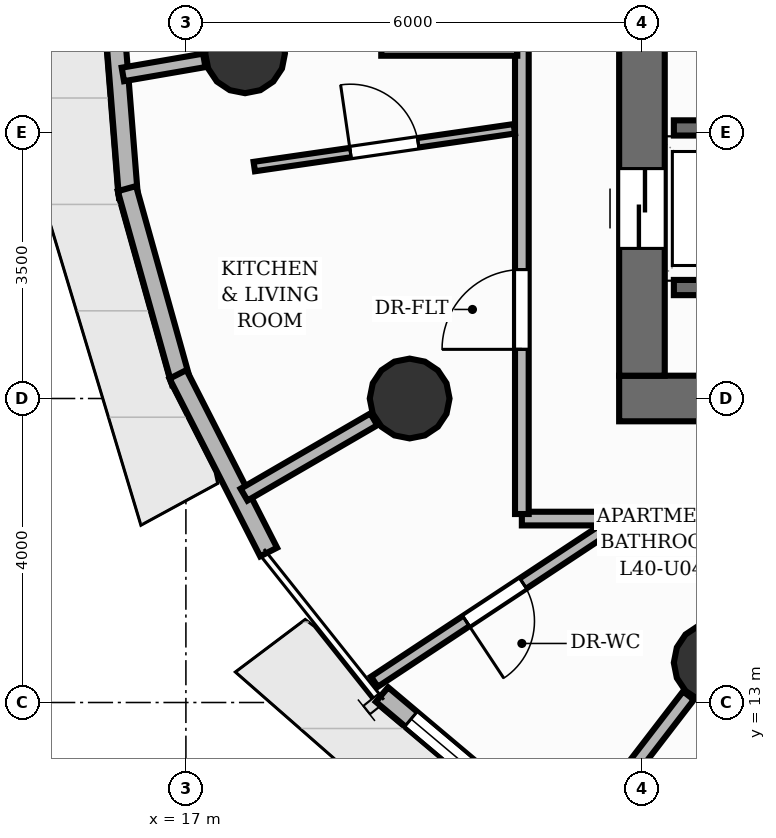
"""IFC4 building model, lengths in metres.
Left out: names, types, materials, properties, quantities, classifications, styles, units other than length and angle.
Written with IfcOpenShell. Run it as: python <this file> out.ifc"""

import sys

from ifc_helpers import new_model, si_unit, direction, frame, frame_2d, origin, origin_2d, place, context, subcontext, project, spatial, rectangle, circle, extrude, element, fill, save


model = new_model("IFC4")
c1 = context("Model", 3, precision=1e-05, world=origin(), true_north=direction((0.0, 1.0)))
c2 = subcontext(c1, "Body", "Model", "MODEL_VIEW")
j1 = project(units=[si_unit("LENGTHUNIT", "METRE"), si_unit("PLANEANGLEUNIT", "RADIAN")], contexts=[c1])
p1 = place(None, origin())
s1 = spatial("IfcSite", under=j1, at=p1, CompositionType="ELEMENT")
p2 = place(p1, origin())
s2 = spatial("IfcBuilding", under=s1, at=p2, CompositionType="ELEMENT")
p3 = place(p2, frame((0.0, 0.0, 136.16)))
s3 = spatial("IfcBuildingStorey", under=s2, at=p3, CompositionType="ELEMENT", Elevation=136.16)
p4 = place(p3, frame((22.7, 17.0, 0.0), z_axis=(0.0, 0.0, 1.0), x_axis=(1.0, 0.0, 0.0)))
e1 = element("IfcWall", 1, at=p4, inside=s3, PredefinedType="SHEAR", context=c2, shape_type="SweptSolid", body=[
    extrude(rectangle(XDim=15.1, YDim=0.6, at=frame_2d((7.55, 0.0))), origin(), (0.0, 0.0, 1.0), 3.2),
])
p5 = place(p4, frame((5.8, 0.0, 0.0)))
e2 = element("IfcOpeningElement", 2, at=p5, cuts=e1, PredefinedType="OPENING", context=c2, shape_type="SweptSolid", body=[
    extrude(rectangle(XDim=1.1, YDim=2.15, at=frame_2d((0.55, 1.075))), frame((0.0, 0.31, 0.0), z_axis=(0.0, -1.0, 0.0), x_axis=(1.0, 0.0, 0.0)), (0.0, 0.0, 1.0), 0.62),
])
p6 = place(p4, frame((9.35, 0.0, 0.0)))
e3 = element("IfcOpeningElement", 3, at=p6, cuts=e1, PredefinedType="OPENING", context=c2, shape_type="SweptSolid", body=[
    extrude(rectangle(XDim=0.9, YDim=2.1, at=frame_2d((0.45, 1.05))), frame((0.0, 0.31, 0.0), z_axis=(0.0, -1.0, 0.0), x_axis=(1.0, 0.0, 0.0)), (0.0, 0.0, 1.0), 0.62),
])
p7 = place(p3, frame((23.0, 17.3, 0.0), z_axis=(0.0, 0.0, 1.0), x_axis=(0.0, 1.0, 0.0)))
e4 = element("IfcWall", 4, at=p7, inside=s3, PredefinedType="SHEAR", context=c2, shape_type="SweptSolid", body=[
    extrude(rectangle(XDim=13.4, YDim=0.6, at=frame_2d((6.7, 0.0))), origin(), (0.0, 0.0, 1.0), 3.2),
])
p8 = place(p7, frame((1.675, 0.0, 0.0)))
e5 = element("IfcOpeningElement", 5, at=p8, cuts=e4, PredefinedType="OPENING", context=c2, shape_type="SweptSolid", body=[
    extrude(rectangle(XDim=1.05, YDim=2.15, at=frame_2d((0.525, 1.075))), frame((0.0, 0.31, 0.0), z_axis=(0.0, -1.0, 0.0), x_axis=(1.0, 0.0, 0.0)), (0.0, 0.0, 1.0), 0.62),
])
p9 = place(p7, frame((6.175, 0.0, 0.0)))
e6 = element("IfcOpeningElement", 6, at=p9, cuts=e4, PredefinedType="OPENING", context=c2, shape_type="SweptSolid", body=[
    extrude(rectangle(XDim=1.05, YDim=2.15, at=frame_2d((0.525, 1.075))), frame((0.0, 0.31, 0.0), z_axis=(0.0, -1.0, 0.0), x_axis=(1.0, 0.0, 0.0)), (0.0, 0.0, 1.0), 0.62),
])
p10 = place(p7, frame((10.675, 0.0, 0.0)))
e7 = element("IfcOpeningElement", 7, at=p10, cuts=e4, PredefinedType="OPENING", context=c2, shape_type="SweptSolid", body=[
    extrude(rectangle(XDim=1.05, YDim=2.15, at=frame_2d((0.525, 1.075))), frame((0.0, 0.31, 0.0), z_axis=(0.0, -1.0, 0.0), x_axis=(1.0, 0.0, 0.0)), (0.0, 0.0, 1.0), 0.62),
])
for number, where, z_axis, x_axis in (
    (8, (17.779, 21.542, 0.0), (0.0, 0.0, 1.0), (1.0, 0.0, 0.0)),
    (9, (19.944, 17.0, 0.0), (0.0, 0.0, 1.0), (1.0, 0.0, 0.0)),
    (10, (23.944, 13.523, 0.0), (0.0, 0.0, 1.0), (1.0, 0.0, 0.0)),
):
    element("IfcColumn", number, at=place(p3, frame(where, z_axis=z_axis, x_axis=x_axis)), inside=s3, PredefinedType="COLUMN", context=c2, shape_type="SweptSolid", body=[
        extrude(circle(Radius=0.525, at=origin_2d()), origin(), (0.0, 0.0, 1.0), 3.2),
    ])
p11 = place(p3, frame((16.244, 19.65, 0.0), z_axis=(0.0, 0.0, 1.0), x_axis=(-0.079420906371, 0.996841170714, 0.0)))
e11 = element("IfcWall", 11, at=p11, inside=s3, PredefinedType="SOLIDWALL", context=c2, shape_type="SweptSolid", body=[
    extrude(rectangle(XDim=2.693, YDim=0.25, at=frame_2d((1.346, 0.0))), origin(), (0.0, 0.0, 1.0), 2.96),
])
p12 = place(p3, frame((16.938, 17.211, 0.0), z_axis=(0.0, 0.0, 1.0), x_axis=(-0.269469206067, 0.963009006698, 0.0)))
e12 = element("IfcWall", 12, at=p12, inside=s3, PredefinedType="SOLIDWALL", context=c2, shape_type="SweptSolid", body=[
    extrude(rectangle(XDim=2.648, YDim=0.25, at=frame_2d((1.324, 0.0))), origin(), (0.0, 0.0, 1.0), 2.96),
])
p13 = place(p3, frame((18.088, 14.98, 0.0), z_axis=(0.0, 0.0, 1.0), x_axis=(-0.454196134835, 0.890901717981, 0.0)))
e13 = element("IfcWall", 13, at=p13, inside=s3, PredefinedType="SOLIDWALL", context=c2, shape_type="SweptSolid", body=[
    extrude(rectangle(XDim=2.624, YDim=0.25, at=frame_2d((1.312, 0.0))), origin(), (0.0, 0.0, 1.0), 2.96),
])
p14 = place(p3, frame((21.605, 11.399, 0.0), z_axis=(0.0, 0.0, 1.0), x_axis=(-0.764825125467, 0.644237943197, 0.0)))
e14 = element("IfcWall", 14, at=p14, inside=s3, PredefinedType="SOLIDWALL", context=c2, shape_type="SweptSolid", body=[
    extrude(rectangle(XDim=2.648, YDim=0.25, at=frame_2d((1.324, 0.0))), origin(), (0.0, 0.0, 1.0), 2.96),
])
p15 = place(p14, frame((0.499, 0.0, 0.85)))
e15 = element("IfcOpeningElement", 15, at=p15, cuts=e14, PredefinedType="OPENING", context=c2, shape_type="SweptSolid", body=[
    extrude(rectangle(XDim=1.65, YDim=1.55, at=frame_2d((0.825, 0.775))), frame((0.0, 0.135, 0.0), z_axis=(0.0, -1.0, 0.0), x_axis=(1.0, 0.0, 0.0)), (0.0, 0.0, 1.0), 0.27),
])
for number, where, z_axis, x_axis in (
    (16, (23.42, 18.46, 0.0), (0.0, 0.0, 1.0), (1.0, 0.0, 0.0)),
    (17, (23.42, 20.56, 0.0), (0.0, 0.0, 1.0), (1.0, 0.0, 0.0)),
):
    element("IfcWall", number, at=place(p3, frame(where, z_axis=z_axis, x_axis=x_axis)), inside=s3, PredefinedType="SHEAR", context=c2, shape_type="SweptSolid", body=[
        extrude(rectangle(XDim=1.71, YDim=0.2, at=frame_2d((0.855, 0.0))), origin(), (0.0, 0.0, 1.0), 3.2),
    ])
p16 = place(p3, frame((17.242, 21.449, 0.0), z_axis=(0.0, 0.0, 1.0), x_axis=(-0.985361391556, -0.170478526599, 0.0)))
e18 = element("IfcWall", 18, at=p16, inside=s3, PredefinedType="PARTITIONING", context=c2, shape_type="SweptSolid", body=[
    extrude(rectangle(XDim=1.087, YDim=0.18, at=frame_2d((0.543, 0.0))), origin(), (0.0, 0.0, 1.0), 2.336),
])
p17 = place(p3, frame((19.472, 16.726, 0.0), z_axis=(0.0, 0.0, 1.0), x_axis=(-0.864844369658, -0.502040054448, 0.0)))
e19 = element("IfcWall", 19, at=p17, inside=s3, PredefinedType="PARTITIONING", context=c2, shape_type="SweptSolid", body=[
    extrude(rectangle(XDim=1.974, YDim=0.18, at=frame_2d((0.987, 0.0))), origin(), (0.0, 0.0, 1.0), 2.336),
])
p18 = place(p3, frame((23.612, 13.092, 0.0), z_axis=(0.0, 0.0, 1.0), x_axis=(-0.609549509747, -0.79274800231, 0.0)))
e20 = element("IfcWall", 20, at=p18, inside=s3, PredefinedType="PARTITIONING", context=c2, shape_type="SweptSolid", body=[
    extrude(rectangle(XDim=2.415, YDim=0.18, at=frame_2d((1.208, 0.0))), origin(), (0.0, 0.0, 1.0), 2.336),
])
p19 = place(p3, frame((39.08, 15.42, 0.0), z_axis=(0.0, 0.0, 1.0), x_axis=(-1.0, 0.0, 0.0)))
e21 = element("IfcWall", 21, at=p19, inside=s3, PredefinedType="PARTITIONING", context=c2, shape_type="SweptSolid", body=[
    extrude(rectangle(XDim=16.39, YDim=0.18, at=frame_2d((8.195, 0.0))), origin(), (0.0, 0.0, 1.0), 2.955),
])
p20 = place(p19, frame((4.593, 0.0, 0.0)))
e22 = element("IfcOpeningElement", 22, at=p20, cuts=e21, PredefinedType="OPENING", context=c2, shape_type="SweptSolid", body=[
    extrude(rectangle(XDim=1.05, YDim=2.15, at=frame_2d((0.525, 1.075))), frame((0.0, 0.1, 0.0), z_axis=(0.0, -1.0, 0.0), x_axis=(1.0, 0.0, 0.0)), (0.0, 0.0, 1.0), 0.2),
])
p21 = place(p3, frame((22.746, 15.42, 0.0), z_axis=(0.0, 0.0, 1.0), x_axis=(-1.0, 0.0, 0.0)))
e23 = element("IfcWall", 23, at=p21, inside=s3, PredefinedType="PARTITIONING", context=c2, shape_type="SweptSolid", body=[
    extrude(rectangle(XDim=1.326, YDim=0.18, at=frame_2d((0.663, 0.0))), origin(), (0.0, 0.0, 1.0), 2.955),
])
p22 = place(p3, frame((21.42, 15.48, 0.0), z_axis=(0.0, 0.0, 1.0), x_axis=(0.0, 1.0, 0.0)))
e24 = element("IfcWall", 24, at=p22, inside=s3, PredefinedType="PARTITIONING", context=c2, shape_type="SweptSolid", body=[
    extrude(rectangle(XDim=6.12, YDim=0.18, at=frame_2d((3.06, 0.0))), origin(), (0.0, 0.0, 1.0), 2.955),
])
p23 = place(p22, frame((2.167, 0.0, 0.0)))
e25 = element("IfcOpeningElement", 25, at=p23, cuts=e24, PredefinedType="OPENING", context=c2, shape_type="SweptSolid", body=[
    extrude(rectangle(XDim=1.05, YDim=2.15, at=frame_2d((0.525, 1.075))), frame((0.0, 0.1, 0.0), z_axis=(0.0, -1.0, 0.0), x_axis=(1.0, 0.0, 0.0)), (0.0, 0.0, 1.0), 0.2),
])
p24 = place(p3, frame((21.36, 21.6, 0.0), z_axis=(0.0, 0.0, 1.0), x_axis=(-1.0, 0.0, 0.0)))
e26 = element("IfcWall", 26, at=p24, inside=s3, PredefinedType="PARTITIONING", context=c2, shape_type="SweptSolid", body=[
    extrude(rectangle(XDim=1.79, YDim=0.18, at=frame_2d((0.895, 0.0))), origin(), (0.0, 0.0, 1.0), 2.336),
])
p25 = place(p3, frame((22.643, 15.365, 0.0), z_axis=(0.0, 0.0, 1.0), x_axis=(-0.83413433024, -0.551561346647, 0.0)))
e27 = element("IfcWall", 27, at=p25, inside=s3, PredefinedType="PLUMBINGWALL", context=c2, shape_type="SweptSolid", body=[
    extrude(rectangle(XDim=3.792, YDim=0.16, at=frame_2d((1.896, 0.0))), origin(), (0.0, 0.0, 1.0), 2.955),
])
p26 = place(p25, frame((1.446, 0.0, 0.0)))
e28 = element("IfcOpeningElement", 28, at=p26, cuts=e27, PredefinedType="OPENING", context=c2, shape_type="SweptSolid", body=[
    extrude(rectangle(XDim=0.9, YDim=2.1, at=frame_2d((0.45, 1.05))), frame((0.0, 0.09, 0.0), z_axis=(0.0, -1.0, 0.0), x_axis=(1.0, 0.0, 0.0)), (0.0, 0.0, 1.0), 0.18),
])
p27 = place(p3, frame((17.899, 20.052, 0.0), z_axis=(0.0, 0.0, 1.0), x_axis=(0.989601977359, 0.143832980941, 0.0)))
e29 = element("IfcWall", 29, at=p27, inside=s3, PredefinedType="PARTITIONING", context=c2, shape_type="SweptSolid", body=[
    extrude(rectangle(XDim=3.458, YDim=0.125, at=frame_2d((1.729, 0.0))), origin(), (0.0, 0.0, 1.0), 2.692),
])
p28 = place(p27, frame((1.279, 0.0, 0.0)))
e30 = element("IfcOpeningElement", 30, at=p28, cuts=e29, PredefinedType="OPENING", context=c2, shape_type="SweptSolid", body=[
    extrude(rectangle(XDim=0.9, YDim=2.1, at=frame_2d((0.45, 1.05))), frame((0.0, 0.073, 0.0), z_axis=(0.0, -1.0, 0.0), x_axis=(1.0, 0.0, 0.0)), (0.0, 0.0, 1.0), 0.145),
])
p29 = place(p15, origin())
e31 = element("IfcWindow", 31, at=p29, inside=s3, PartitioningType="SINGLE_PANEL", PredefinedType="WINDOW", context=c2, shape_type="SweptSolid", body=[
    extrude(rectangle(XDim=1.65, YDim=1.55, at=frame_2d((0.825, 0.775))), frame((0.0, 0.03, 0.0), z_axis=(0.0, -1.0, 0.0), x_axis=(1.0, 0.0, 0.0)), (0.0, 0.0, 1.0), 0.06),
])
fill(e15, e31)
p30 = place(p8, origin())
e32 = element("IfcDoor", 32, at=p30, inside=s3, OperationType="DOUBLE_DOOR_SLIDING", PredefinedType="DOOR", context=c2, shape_type="SweptSolid", body=[
    extrude(rectangle(XDim=1.05, YDim=2.15, at=frame_2d((0.525, 1.075))), frame((0.0, 0.025, 0.0), z_axis=(0.0, -1.0, 0.0), x_axis=(1.0, 0.0, 0.0)), (0.0, 0.0, 1.0), 0.05),
])
fill(e5, e32)
p31 = place(p23, origin())
e33 = element("IfcDoor", 33, at=p31, inside=s3, OperationType="SINGLE_SWING_LEFT", PredefinedType="DOOR", context=c2, shape_type="SweptSolid", body=[
    extrude(rectangle(XDim=1.05, YDim=2.15, at=frame_2d((0.525, 1.075))), frame((0.0, 0.025, 0.0), z_axis=(0.0, -1.0, 0.0), x_axis=(1.0, 0.0, 0.0)), (0.0, 0.0, 1.0), 0.05),
])
fill(e25, e33)
p32 = place(p26, origin())
e34 = element("IfcDoor", 34, at=p32, inside=s3, OperationType="SINGLE_SWING_RIGHT", PredefinedType="DOOR", context=c2, shape_type="SweptSolid", body=[
    extrude(rectangle(XDim=0.9, YDim=2.1, at=frame_2d((0.45, 1.05))), frame((0.0, 0.025, 0.0), z_axis=(0.0, -1.0, 0.0), x_axis=(1.0, 0.0, 0.0)), (0.0, 0.0, 1.0), 0.05),
])
fill(e28, e34)
p33 = place(p28, origin())
e35 = element("IfcDoor", 35, at=p33, inside=s3, OperationType="SINGLE_SWING_LEFT", PredefinedType="DOOR", context=c2, shape_type="SweptSolid", body=[
    extrude(rectangle(XDim=0.9, YDim=2.1, at=frame_2d((0.45, 1.05))), frame((0.0, 0.025, 0.0), z_axis=(0.0, -1.0, 0.0), x_axis=(1.0, 0.0, 0.0)), (0.0, 0.0, 1.0), 0.05),
])
fill(e30, e35)
save(model, sys.argv[1])
